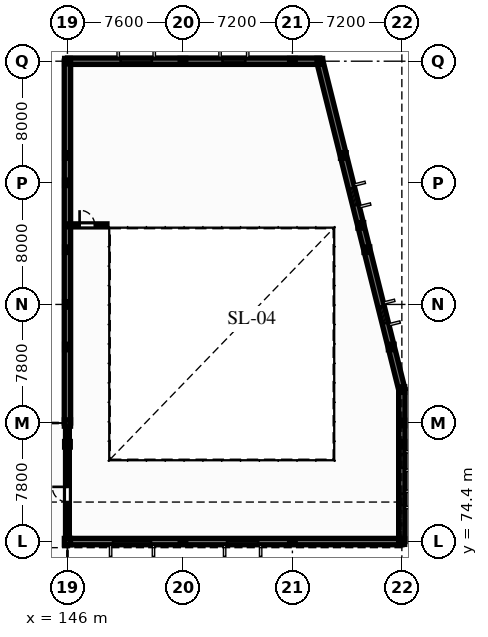
"""IFC4 building model, lengths in metres.
Left out: names, types, materials, properties, quantities, classifications, styles, units other than length and angle.
Written with IfcOpenShell. Run it as: python <this file> out.ifc"""

import sys

from ifc_helpers import new_model, si_unit, direction, frame, frame_2d, origin, origin_2d, place, context, subcontext, project, spatial, polyline, rectangle, i_section, outline, extrude, element, fill, save


model = new_model("IFC4")
c1 = context("Model", 3, precision=1e-05, world=origin(), true_north=direction((0.0, 1.0)))
c2 = subcontext(c1, "Body", "Model", "MODEL_VIEW")
j1 = project(units=[si_unit("LENGTHUNIT", "METRE"), si_unit("PLANEANGLEUNIT", "RADIAN")], contexts=[c1])
p1 = place(None, origin())
s1 = spatial("IfcSite", under=j1, at=p1, CompositionType="ELEMENT")
p2 = place(p1, origin())
s2 = spatial("IfcBuilding", under=s1, at=p2, CompositionType="ELEMENT")
p3 = place(p2, frame((0.0, 0.0, 8.94)))
s3 = spatial("IfcBuildingStorey", under=s2, at=p3, CompositionType="ELEMENT", Elevation=8.94)
for number, where, z_axis, x_axis in (
    (1, (146.0, 74.4, 0.0), (0.0, 0.0, 1.0), (1.0, 0.0, 0.0)),
    (2, (146.0, 82.2, 0.0), (0.0, 0.0, 1.0), (1.0, 0.0, 0.0)),
):
    element("IfcColumn", number, at=place(p3, frame(where, z_axis=z_axis, x_axis=x_axis)), inside=s3, PredefinedType="COLUMN", context=c2, shape_type="SweptSolid", body=[
        extrude(i_section(OverallWidth=0.406, OverallDepth=0.417, WebThickness=0.03, FlangeThickness=0.048, at=origin_2d()), origin(), (0.0, 0.0, 1.0), 3.84),
    ])
for number, where, z_axis, x_axis in (
    (3, (146.0, 90.0, 0.0), (0.0, 0.0, 1.0), (1.0, 0.0, 0.0)),
    (4, (146.0, 98.0, 0.0), (0.0, 0.0, 1.0), (1.0, 0.0, 0.0)),
    (5, (146.0, 106.0, 0.0), (0.0, 0.0, 1.0), (1.0, 0.0, 0.0)),
    (6, (153.6, 74.4, 0.0), (0.0, 0.0, 1.0), (1.0, 0.0, 0.0)),
    (7, (153.6, 106.0, 0.0), (0.0, 0.0, 1.0), (1.0, 0.0, 0.0)),
    (8, (160.8, 74.4, 0.0), (0.0, 0.0, 1.0), (1.0, 0.0, 0.0)),
    (9, (160.8, 106.0, 0.0), (0.0, 0.0, 1.0), (1.0, 0.0, 0.0)),
    (10, (162.6, 106.0, 0.0), (0.0, 0.0, 1.0), (1.0, 0.0, 0.0)),
    (11, (165.3, 95.2, 0.0), (0.0, 0.0, 1.0), (1.0, 0.0, 0.0)),
    (12, (168.0, 74.4, 0.0), (0.0, 0.0, 1.0), (1.0, 0.0, 0.0)),
    (13, (168.0, 82.2, 0.0), (0.0, 0.0, 1.0), (1.0, 0.0, 0.0)),
    (14, (168.0, 84.4, 0.0), (0.0, 0.0, 1.0), (1.0, 0.0, 0.0)),
    (15, (146.0, 80.8, 0.0), (0.0, 0.0, 1.0), (1.0, 0.0, 0.0)),
):
    element("IfcColumn", number, at=place(p3, frame(where, z_axis=z_axis, x_axis=x_axis)), inside=s3, PredefinedType="COLUMN", context=c2, shape_type="SweptSolid", body=[
        extrude(i_section(OverallWidth=0.373, OverallDepth=0.368, WebThickness=0.015, FlangeThickness=0.024, at=origin_2d()), origin(), (0.0, 0.0, 1.0), 3.84),
    ])
p4 = place(p3, frame((168.0, 80.8, 0.0), z_axis=(0.0, 0.0, 1.0), x_axis=(1.0, 0.0, 0.0)))
e16 = element("IfcColumn", 16, at=p4, inside=s3, PredefinedType="COLUMN", context=c2, shape_type="SweptSolid", body=[
    extrude(i_section(OverallWidth=0.373, OverallDepth=0.368, WebThickness=0.015, FlangeThickness=0.024, at=origin_2d()), origin(), (0.0, 0.0, 1.0), 2.28),
])
p5 = place(p3, frame((146.0, 87.2, 0.0), z_axis=(0.0, 0.0, 1.0), x_axis=(1.0, 0.0, 0.0)))
e17 = element("IfcColumn", 17, at=p5, inside=s3, PredefinedType="COLUMN", context=c2, shape_type="SweptSolid", body=[
    extrude(i_section(OverallWidth=0.373, OverallDepth=0.368, WebThickness=0.015, FlangeThickness=0.024, at=origin_2d()), origin(), (0.0, 0.0, 1.0), 3.84),
])
p6 = place(p3, frame((167.3, 87.2, 0.0), z_axis=(0.0, 0.0, 1.0), x_axis=(1.0, 0.0, 0.0)))
e18 = element("IfcColumn", 18, at=p6, inside=s3, PredefinedType="COLUMN", context=c2, shape_type="SweptSolid", body=[
    extrude(i_section(OverallWidth=0.373, OverallDepth=0.368, WebThickness=0.015, FlangeThickness=0.024, at=origin_2d()), origin(), (0.0, 0.0, 1.0), 2.449),
])
p7 = place(p3, frame((146.0, 93.6, 0.0), z_axis=(0.0, 0.0, 1.0), x_axis=(1.0, 0.0, 0.0)))
e19 = element("IfcColumn", 19, at=p7, inside=s3, PredefinedType="COLUMN", context=c2, shape_type="SweptSolid", body=[
    extrude(i_section(OverallWidth=0.373, OverallDepth=0.368, WebThickness=0.015, FlangeThickness=0.024, at=origin_2d()), origin(), (0.0, 0.0, 1.0), 3.84),
])
p8 = place(p3, frame((165.7, 93.6, 0.0), z_axis=(0.0, 0.0, 1.0), x_axis=(1.0, 0.0, 0.0)))
e20 = element("IfcColumn", 20, at=p8, inside=s3, PredefinedType="COLUMN", context=c2, shape_type="SweptSolid", body=[
    extrude(i_section(OverallWidth=0.373, OverallDepth=0.368, WebThickness=0.015, FlangeThickness=0.024, at=origin_2d()), origin(), (0.0, 0.0, 1.0), 2.834),
])
p9 = place(p3, frame((146.0, 99.8, 0.0), z_axis=(0.0, 0.0, 1.0), x_axis=(1.0, 0.0, 0.0)))
e21 = element("IfcColumn", 21, at=p9, inside=s3, PredefinedType="COLUMN", context=c2, shape_type="SweptSolid", body=[
    extrude(i_section(OverallWidth=0.373, OverallDepth=0.368, WebThickness=0.015, FlangeThickness=0.024, at=origin_2d()), origin(), (0.0, 0.0, 1.0), 3.84),
])
p10 = place(p3, frame((164.15, 99.8, 0.0), z_axis=(0.0, 0.0, 1.0), x_axis=(1.0, 0.0, 0.0)))
e22 = element("IfcColumn", 22, at=p10, inside=s3, PredefinedType="COLUMN", context=c2, shape_type="SweptSolid", body=[
    extrude(i_section(OverallWidth=0.373, OverallDepth=0.368, WebThickness=0.015, FlangeThickness=0.024, at=origin_2d()), origin(), (0.0, 0.0, 1.0), 3.208),
])
p11 = place(p3, frame((146.0, 74.4, 0.0), z_axis=(0.0, 0.0, 1.0), x_axis=(1.0, 0.0, 0.0)))
e23 = element("IfcWall", 23, at=p11, inside=s3, PredefinedType="SOLIDWALL", context=c2, shape_type="SweptSolid", body=[
    extrude(outline(polyline([(0.0, 0.0), (22.0, 0.0), (22.0, 3.94), (0.0, 9.24), (0.0, 0.0)])), frame((0.0, 0.21, 0.0), z_axis=(0.0, -1.0, 0.0), x_axis=(1.0, 0.0, 0.0)), (0.0, 0.0, 1.0), 0.42),
])
p12 = place(p11, frame((3.0, 0.0, 0.95)))
e24 = element("IfcOpeningElement", 24, at=p12, cuts=e23, PredefinedType="OPENING", context=c2, shape_type="SweptSolid", body=[
    extrude(rectangle(XDim=2.5, YDim=2.0, at=frame_2d((1.25, 1.0))), frame((0.0, 0.22, 0.0), z_axis=(0.0, -1.0, 0.0), x_axis=(1.0, 0.0, 0.0)), (0.0, 0.0, 1.0), 0.44),
])
p13 = place(p11, frame((10.5, 0.0, 0.95)))
e25 = element("IfcOpeningElement", 25, at=p13, cuts=e23, PredefinedType="OPENING", context=c2, shape_type="SweptSolid", body=[
    extrude(rectangle(XDim=2.05, YDim=1.85, at=frame_2d((1.025, 0.925))), frame((0.0, 0.22, 0.0), z_axis=(0.0, -1.0, 0.0), x_axis=(1.0, 0.0, 0.0)), (0.0, 0.0, 1.0), 0.44),
])
p14 = place(p3, frame((168.0, 74.4, 0.0), z_axis=(0.0, 0.0, 1.0), x_axis=(0.0, 1.0, 0.0)))
e26 = element("IfcWall", 26, at=p14, inside=s3, PredefinedType="SOLIDWALL", context=c2, shape_type="SweptSolid", body=[
    extrude(rectangle(XDim=10.0, YDim=0.42, at=frame_2d((5.0, 0.0))), origin(), (0.0, 0.0, 1.0), 3.94),
])
p15 = place(p14, frame((2.4, 0.0, 1.0)))
e27 = element("IfcOpeningElement", 27, at=p15, cuts=e26, PredefinedType="OPENING", context=c2, shape_type="SweptSolid", body=[
    extrude(rectangle(XDim=0.75, YDim=2.2, at=frame_2d((0.375, 1.1))), frame((0.0, 0.22, 0.0), z_axis=(0.0, -1.0, 0.0), x_axis=(1.0, 0.0, 0.0)), (0.0, 0.0, 1.0), 0.44),
])
p16 = place(p14, frame((4.85, 0.0, 1.0)))
e28 = element("IfcOpeningElement", 28, at=p16, cuts=e26, PredefinedType="OPENING", context=c2, shape_type="SweptSolid", body=[
    extrude(rectangle(XDim=0.9, YDim=2.2, at=frame_2d((0.45, 1.1))), frame((0.0, 0.22, 0.0), z_axis=(0.0, -1.0, 0.0), x_axis=(1.0, 0.0, 0.0)), (0.0, 0.0, 1.0), 0.44),
])
p17 = place(p3, frame((168.0, 84.4, 0.0), z_axis=(0.0, 0.0, 1.0), x_axis=(-0.242530464893, 0.970143790167, 0.0)))
e29 = element("IfcWall", 29, at=p17, inside=s3, PredefinedType="SOLIDWALL", context=c2, shape_type="SweptSolid", body=[
    extrude(outline(polyline([(0.0, 0.0), (22.265, 0.0), (22.265, 5.241), (0.0, 3.94), (0.0, 0.0)])), frame((0.0, 0.21, 0.0), z_axis=(0.0, -1.0, 0.0), x_axis=(1.0, 0.0, 0.0)), (0.0, 0.0, 1.0), 0.42),
])
p18 = place(p17, frame((4.5, 0.0, 0.95)))
e30 = element("IfcOpeningElement", 30, at=p18, cuts=e29, PredefinedType="OPENING", context=c2, shape_type="SweptSolid", body=[
    extrude(rectangle(XDim=1.15, YDim=2.3, at=frame_2d((0.575, 1.15))), frame((0.0, 0.22, 0.0), z_axis=(0.0, -1.0, 0.0), x_axis=(1.0, 0.0, 0.0)), (0.0, 0.0, 1.0), 0.44),
])
p19 = place(p17, frame((12.5, 0.0, 0.95)))
e31 = element("IfcOpeningElement", 31, at=p19, cuts=e29, PredefinedType="OPENING", context=c2, shape_type="SweptSolid", body=[
    extrude(rectangle(XDim=1.15, YDim=2.3, at=frame_2d((0.575, 1.15))), frame((0.0, 0.22, 0.0), z_axis=(0.0, -1.0, 0.0), x_axis=(1.0, 0.0, 0.0)), (0.0, 0.0, 1.0), 0.44),
])
p20 = place(p3, frame((146.0, 106.0, 0.0), z_axis=(0.0, 0.0, 1.0), x_axis=(1.0, 0.0, 0.0)))
e32 = element("IfcWall", 32, at=p20, inside=s3, PredefinedType="SOLIDWALL", context=c2, shape_type="SweptSolid", body=[
    extrude(outline(polyline([(0.0, 0.0), (16.6, 0.0), (16.6, 5.241), (0.0, 9.24), (0.0, 0.0)])), frame((0.0, 0.21, 0.0), z_axis=(0.0, -1.0, 0.0), x_axis=(1.0, 0.0, 0.0)), (0.0, 0.0, 1.0), 0.42),
])
p21 = place(p20, frame((3.5, 0.0, 1.0)))
e33 = element("IfcOpeningElement", 33, at=p21, cuts=e32, PredefinedType="OPENING", context=c2, shape_type="SweptSolid", body=[
    extrude(rectangle(XDim=2.05, YDim=1.85, at=frame_2d((1.025, 0.925))), frame((0.0, 0.22, 0.0), z_axis=(0.0, -1.0, 0.0), x_axis=(1.0, 0.0, 0.0)), (0.0, 0.0, 1.0), 0.44),
])
p22 = place(p20, frame((10.2, 0.0, 1.0)))
e34 = element("IfcOpeningElement", 34, at=p22, cuts=e32, PredefinedType="OPENING", context=c2, shape_type="SweptSolid", body=[
    extrude(rectangle(XDim=1.5, YDim=2.1, at=frame_2d((0.75, 1.05))), frame((0.0, 0.22, 0.0), z_axis=(0.0, -1.0, 0.0), x_axis=(1.0, 0.0, 0.0)), (0.0, 0.0, 1.0), 0.44),
])
p23 = place(p3, frame((146.0, 82.2, 0.0), z_axis=(0.0, 0.0, 1.0), x_axis=(0.0, 1.0, 0.0)))
e35 = element("IfcWall", 35, at=p23, inside=s3, PredefinedType="SOLIDWALL", context=c2, shape_type="SweptSolid", body=[
    extrude(rectangle(XDim=23.8, YDim=0.42, at=frame_2d((11.9, 0.0))), origin(), (0.0, 0.0, 1.0), 9.24),
])
p24 = place(p3, frame((146.0, 74.4, 0.0), z_axis=(0.0, 0.0, 1.0), x_axis=(0.0, 1.0, 0.0)))
e36 = element("IfcWall", 36, at=p24, inside=s3, PredefinedType="PARTITIONING", context=c2, shape_type="SweptSolid", body=[
    extrude(rectangle(XDim=7.8, YDim=0.25, at=frame_2d((3.9, 0.0))), origin(), (0.0, 0.0, 1.0), 3.058),
])
p25 = place(p24, frame((2.6, 0.0, 0.0)))
e37 = element("IfcOpeningElement", 37, at=p25, cuts=e36, PredefinedType="OPENING", context=c2, shape_type="SweptSolid", body=[
    extrude(rectangle(XDim=1.0, YDim=2.15, at=frame_2d((0.5, 1.075))), frame((0.0, 0.135, 0.0), z_axis=(0.0, -1.0, 0.0), x_axis=(1.0, 0.0, 0.0)), (0.0, 0.0, 1.0), 0.27),
])
p26 = place(p3, frame((146.0, 95.2, 0.0), z_axis=(0.0, 0.0, 1.0), x_axis=(1.0, 0.0, 0.0)))
e38 = element("IfcWall", 38, at=p26, inside=s3, PredefinedType="PARTITIONING", context=c2, shape_type="SweptSolid", body=[
    extrude(rectangle(XDim=2.6, YDim=0.2, at=frame_2d((1.3, 0.0))), origin(), (0.0, 0.0, 1.0), 3.53),
])
p27 = place(p26, frame((0.8, 0.0, 0.0)))
e39 = element("IfcOpeningElement", 39, at=p27, cuts=e38, PredefinedType="OPENING", context=c2, shape_type="SweptSolid", body=[
    extrude(rectangle(XDim=1.0, YDim=2.15, at=frame_2d((0.5, 1.075))), frame((0.0, 0.11, 0.0), z_axis=(0.0, -1.0, 0.0), x_axis=(1.0, 0.0, 0.0)), (0.0, 0.0, 1.0), 0.22),
])
p28 = place(p12, origin())
e40 = element("IfcWindow", 40, at=p28, inside=s3, PartitioningType="SINGLE_PANEL", PredefinedType="WINDOW", context=c2, shape_type="SweptSolid", body=[
    extrude(rectangle(XDim=2.5, YDim=2.0, at=frame_2d((1.25, 1.0))), frame((0.0, 0.03, 0.0), z_axis=(0.0, -1.0, 0.0), x_axis=(1.0, 0.0, 0.0)), (0.0, 0.0, 1.0), 0.06),
])
fill(e24, e40)
p29 = place(p13, origin())
e41 = element("IfcWindow", 41, at=p29, inside=s3, PartitioningType="SINGLE_PANEL", PredefinedType="WINDOW", context=c2, shape_type="SweptSolid", body=[
    extrude(rectangle(XDim=2.05, YDim=1.85, at=frame_2d((1.025, 0.925))), frame((0.0, 0.03, 0.0), z_axis=(0.0, -1.0, 0.0), x_axis=(1.0, 0.0, 0.0)), (0.0, 0.0, 1.0), 0.06),
])
fill(e25, e41)
p30 = place(p15, origin())
e42 = element("IfcWindow", 42, at=p30, inside=s3, PartitioningType="SINGLE_PANEL", PredefinedType="WINDOW", context=c2, shape_type="SweptSolid", body=[
    extrude(rectangle(XDim=0.75, YDim=2.2, at=frame_2d((0.375, 1.1))), frame((0.0, 0.03, 0.0), z_axis=(0.0, -1.0, 0.0), x_axis=(1.0, 0.0, 0.0)), (0.0, 0.0, 1.0), 0.06),
])
fill(e27, e42)
p31 = place(p16, origin())
e43 = element("IfcWindow", 43, at=p31, inside=s3, PartitioningType="SINGLE_PANEL", PredefinedType="WINDOW", context=c2, shape_type="SweptSolid", body=[
    extrude(rectangle(XDim=0.9, YDim=2.2, at=frame_2d((0.45, 1.1))), frame((0.0, 0.03, 0.0), z_axis=(0.0, -1.0, 0.0), x_axis=(1.0, 0.0, 0.0)), (0.0, 0.0, 1.0), 0.06),
])
fill(e28, e43)
p32 = place(p18, origin())
e44 = element("IfcWindow", 44, at=p32, inside=s3, PartitioningType="SINGLE_PANEL", PredefinedType="WINDOW", context=c2, shape_type="SweptSolid", body=[
    extrude(rectangle(XDim=1.15, YDim=2.3, at=frame_2d((0.575, 1.15))), frame((0.0, 0.03, 0.0), z_axis=(0.0, -1.0, 0.0), x_axis=(1.0, 0.0, 0.0)), (0.0, 0.0, 1.0), 0.06),
])
fill(e30, e44)
p33 = place(p19, origin())
e45 = element("IfcWindow", 45, at=p33, inside=s3, PartitioningType="SINGLE_PANEL", PredefinedType="WINDOW", context=c2, shape_type="SweptSolid", body=[
    extrude(rectangle(XDim=1.15, YDim=2.3, at=frame_2d((0.575, 1.15))), frame((0.0, 0.03, 0.0), z_axis=(0.0, -1.0, 0.0), x_axis=(1.0, 0.0, 0.0)), (0.0, 0.0, 1.0), 0.06),
])
fill(e31, e45)
p34 = place(p21, origin())
e46 = element("IfcWindow", 46, at=p34, inside=s3, PartitioningType="SINGLE_PANEL", PredefinedType="WINDOW", context=c2, shape_type="SweptSolid", body=[
    extrude(rectangle(XDim=2.05, YDim=1.85, at=frame_2d((1.025, 0.925))), frame((0.0, 0.03, 0.0), z_axis=(0.0, -1.0, 0.0), x_axis=(1.0, 0.0, 0.0)), (0.0, 0.0, 1.0), 0.06),
])
fill(e33, e46)
p35 = place(p22, origin())
e47 = element("IfcWindow", 47, at=p35, inside=s3, PartitioningType="SINGLE_PANEL", PredefinedType="WINDOW", context=c2, shape_type="SweptSolid", body=[
    extrude(rectangle(XDim=1.5, YDim=2.1, at=frame_2d((0.75, 1.05))), frame((0.0, 0.03, 0.0), z_axis=(0.0, -1.0, 0.0), x_axis=(1.0, 0.0, 0.0)), (0.0, 0.0, 1.0), 0.06),
])
fill(e34, e47)
p36 = place(p25, origin())
e48 = element("IfcDoor", 48, at=p36, inside=s3, OperationType="SINGLE_SWING_RIGHT", PredefinedType="DOOR", context=c2, shape_type="SweptSolid", body=[
    extrude(rectangle(XDim=1.0, YDim=2.15, at=frame_2d((0.5, 1.075))), frame((0.0, 0.025, 0.0), z_axis=(0.0, -1.0, 0.0), x_axis=(1.0, 0.0, 0.0)), (0.0, 0.0, 1.0), 0.05),
])
fill(e37, e48)
p37 = place(p27, origin())
e49 = element("IfcDoor", 49, at=p37, inside=s3, OperationType="SINGLE_SWING_LEFT", PredefinedType="DOOR", context=c2, shape_type="SweptSolid", body=[
    extrude(rectangle(XDim=1.0, YDim=2.15, at=frame_2d((0.5, 1.075))), frame((0.0, 0.025, 0.0), z_axis=(0.0, -1.0, 0.0), x_axis=(1.0, 0.0, 0.0)), (0.0, 0.0, 1.0), 0.05),
])
fill(e39, e49)
save(model, sys.argv[1])
